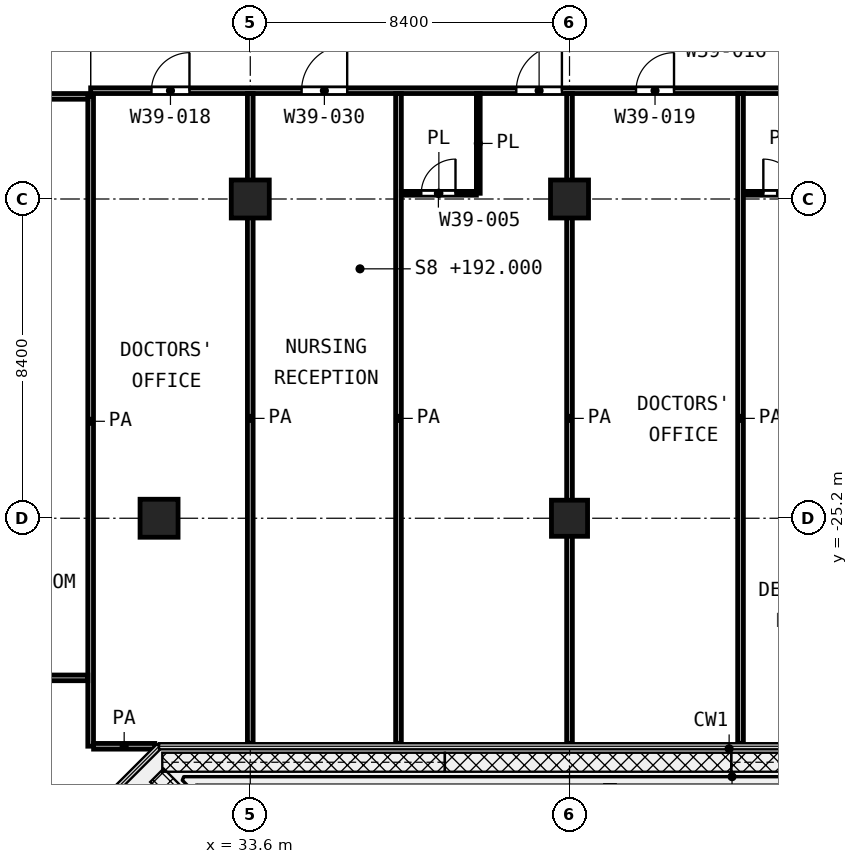
"""IFC4 building model, lengths in metres.
Left out: names, types, materials, properties, quantities, classifications, styles, units other than length and angle.
Written with IfcOpenShell. Run it as: python <this file> out.ifc"""

import sys

from ifc_helpers import new_model, si_unit, direction, frame, frame_2d, origin, origin_2d, place, context, subcontext, project, spatial, rectangle, extrude, element, fill, save


model = new_model("IFC4")
c1 = context("Model", 3, precision=1e-05, world=origin(), true_north=direction((0.0, 1.0)))
c2 = subcontext(c1, "Body", "Model", "MODEL_VIEW")
j1 = project(units=[si_unit("LENGTHUNIT", "METRE"), si_unit("PLANEANGLEUNIT", "RADIAN")], contexts=[c1])
p1 = place(None, origin())
s1 = spatial("IfcSite", under=j1, at=p1, CompositionType="ELEMENT")
p2 = place(p1, origin())
s2 = spatial("IfcBuilding", under=s1, at=p2, CompositionType="ELEMENT")
p3 = place(p2, frame((0.0, 0.0, 192.0)))
s3 = spatial("IfcBuildingStorey", under=s2, at=p3, CompositionType="ELEMENT", Elevation=192.0)
for number, where, z_axis, x_axis in (
    (1, (33.6, -16.8, 0.0), (0.0, 0.0, 1.0), (1.0, 0.0, 0.0)),
    (2, (42.0, -16.8, 0.0), (0.0, 0.0, 1.0), (1.0, 0.0, 0.0)),
    (3, (31.2, -25.2, 0.0), (0.0, 0.0, 1.0), (1.0, 0.0, 0.0)),
):
    element("IfcColumn", number, at=place(p3, frame(where, z_axis=z_axis, x_axis=x_axis)), inside=s3, PredefinedType="COLUMN", context=c2, shape_type="SweptSolid", body=[
        extrude(rectangle(XDim=1.0, YDim=1.0, at=origin_2d()), origin(), (0.0, 0.0, 1.0), 4.2),
    ])
p4 = place(p3, frame((42.0, -25.2, 0.0), z_axis=(0.0, 0.0, 1.0), x_axis=(1.0, 0.0, 0.0)))
e4 = element("IfcColumn", 4, at=p4, inside=s3, PredefinedType="COLUMN", context=c2, shape_type="SweptSolid", body=[
    extrude(rectangle(XDim=0.95, YDim=0.95, at=origin_2d()), origin(), (0.0, 0.0, 1.0), 4.2),
])
p5 = place(p3, frame((37.575, -16.65, 0.0), z_axis=(0.0, 0.0, 1.0), x_axis=(1.0, 0.0, 0.0)))
e5 = element("IfcWall", 5, at=p5, inside=s3, PredefinedType="PARTITIONING", context=c2, shape_type="SweptSolid", body=[
    extrude(rectangle(XDim=1.975, YDim=0.1, at=frame_2d((0.988, 0.0))), origin(), (0.0, 0.0, 1.0), 3.6),
])
p6 = place(p5, frame((0.525, 0.0, 0.0)))
e6 = element("IfcOpeningElement", 6, at=p6, cuts=e5, PredefinedType="OPENING", context=c2, shape_type="SweptSolid", body=[
    extrude(rectangle(XDim=0.9, YDim=2.1, at=frame_2d((0.45, 1.05))), frame((0.0, 0.06, 0.0), z_axis=(0.0, -1.0, 0.0), x_axis=(1.0, 0.0, 0.0)), (0.0, 0.0, 1.0), 0.12),
])
p7 = place(p3, frame((46.575, -16.65, 0.0), z_axis=(0.0, 0.0, 1.0), x_axis=(1.0, 0.0, 0.0)))
e7 = element("IfcWall", 7, at=p7, inside=s3, PredefinedType="PARTITIONING", context=c2, shape_type="SweptSolid", body=[
    extrude(rectangle(XDim=1.975, YDim=0.1, at=frame_2d((0.988, 0.0))), origin(), (0.0, 0.0, 1.0), 3.6),
])
p8 = place(p7, frame((0.525, 0.0, 0.0)))
e8 = element("IfcOpeningElement", 8, at=p8, cuts=e7, PredefinedType="OPENING", context=c2, shape_type="SweptSolid", body=[
    extrude(rectangle(XDim=0.9, YDim=2.1, at=frame_2d((0.45, 1.05))), frame((0.0, 0.06, 0.0), z_axis=(0.0, -1.0, 0.0), x_axis=(1.0, 0.0, 0.0)), (0.0, 0.0, 1.0), 0.12),
])
p9 = place(p3, frame((39.6, -16.65, 0.0), z_axis=(0.0, 0.0, 1.0), x_axis=(0.0, 1.0, 0.0)))
e9 = element("IfcWall", 9, at=p9, inside=s3, PredefinedType="PARTITIONING", context=c2, shape_type="SweptSolid", body=[
    extrude(rectangle(XDim=2.625, YDim=0.1, at=frame_2d((1.312, 0.0))), origin(), (0.0, 0.0, 1.0), 3.6),
])
p10 = place(p3, frame((29.477, -31.2, 0.0), z_axis=(0.0, 0.0, 1.0), x_axis=(1.0, 0.0, 0.0)))
e10 = element("IfcWall", 10, at=p10, inside=s3, PredefinedType="PARTITIONING", context=c2, shape_type="SweptSolid", body=[
    extrude(rectangle(XDim=1.61, YDim=0.15, at=frame_2d((0.805, 0.0))), origin(), (0.0, 0.0, 1.0), 3.6),
])
p11 = place(p3, frame((14.175, -29.4, 0.0), z_axis=(0.0, 0.0, 1.0), x_axis=(1.0, 0.0, 0.0)))
e11 = element("IfcWall", 11, at=p11, inside=s3, PredefinedType="PARTITIONING", context=c2, shape_type="SweptSolid", body=[
    extrude(rectangle(XDim=15.15, YDim=0.15, at=frame_2d((7.575, 0.0))), origin(), (0.0, 0.0, 1.0), 3.6),
])
p12 = place(p3, frame((24.9, -14.1, 0.0), z_axis=(0.0, 0.0, 1.0), x_axis=(1.0, 0.0, 0.0)))
e12 = element("IfcWall", 12, at=p12, inside=s3, PredefinedType="PARTITIONING", context=c2, shape_type="SweptSolid", body=[
    extrude(rectangle(XDim=4.425, YDim=0.15, at=frame_2d((2.212, 0.0))), origin(), (0.0, 0.0, 1.0), 3.6),
])
p13 = place(p12, frame((1.65, 0.0, 0.0)))
e13 = element("IfcOpeningElement", 13, at=p13, cuts=e12, PredefinedType="OPENING", context=c2, shape_type="SweptSolid", body=[
    extrude(rectangle(XDim=1.5, YDim=2.1, at=frame_2d((0.75, 1.05))), frame((0.0, 0.085, 0.0), z_axis=(0.0, -1.0, 0.0), x_axis=(1.0, 0.0, 0.0)), (0.0, 0.0, 1.0), 0.17),
])
p14 = place(p3, frame((29.4, -13.95, 0.0), z_axis=(0.0, 0.0, 1.0), x_axis=(1.0, 0.0, 0.0)))
e14 = element("IfcWall", 14, at=p14, inside=s3, PredefinedType="PARTITIONING", context=c2, shape_type="SweptSolid", body=[
    extrude(rectangle(XDim=37.72, YDim=0.15, at=frame_2d((18.86, 0.0))), origin(), (0.0, 0.0, 1.0), 3.6),
])
p15 = place(p14, frame((1.6, 0.0, 0.0)))
e15 = element("IfcOpeningElement", 15, at=p15, cuts=e14, PredefinedType="OPENING", context=c2, shape_type="SweptSolid", body=[
    extrude(rectangle(XDim=1.0, YDim=2.1, at=frame_2d((0.5, 1.05))), frame((0.0, 0.085, 0.0), z_axis=(0.0, -1.0, 0.0), x_axis=(1.0, 0.0, 0.0)), (0.0, 0.0, 1.0), 0.17),
])
p16 = place(p14, frame((5.55, 0.0, 0.0)))
e16 = element("IfcOpeningElement", 16, at=p16, cuts=e14, PredefinedType="OPENING", context=c2, shape_type="SweptSolid", body=[
    extrude(rectangle(XDim=1.2, YDim=2.1, at=frame_2d((0.6, 1.05))), frame((0.0, 0.085, 0.0), z_axis=(0.0, -1.0, 0.0), x_axis=(1.0, 0.0, 0.0)), (0.0, 0.0, 1.0), 0.17),
])
p17 = place(p14, frame((11.2, 0.0, 0.0)))
e17 = element("IfcOpeningElement", 17, at=p17, cuts=e14, PredefinedType="OPENING", context=c2, shape_type="SweptSolid", body=[
    extrude(rectangle(XDim=1.2, YDim=2.1, at=frame_2d((0.6, 1.05))), frame((0.0, 0.085, 0.0), z_axis=(0.0, -1.0, 0.0), x_axis=(1.0, 0.0, 0.0)), (0.0, 0.0, 1.0), 0.17),
])
p18 = place(p14, frame((14.35, 0.0, 0.0)))
e18 = element("IfcOpeningElement", 18, at=p18, cuts=e14, PredefinedType="OPENING", context=c2, shape_type="SweptSolid", body=[
    extrude(rectangle(XDim=1.0, YDim=2.1, at=frame_2d((0.5, 1.05))), frame((0.0, 0.085, 0.0), z_axis=(0.0, -1.0, 0.0), x_axis=(1.0, 0.0, 0.0)), (0.0, 0.0, 1.0), 0.17),
])
p19 = place(p14, frame((19.6, 0.0, 0.0)))
e19 = element("IfcOpeningElement", 19, at=p19, cuts=e14, PredefinedType="OPENING", context=c2, shape_type="SweptSolid", body=[
    extrude(rectangle(XDim=1.2, YDim=2.1, at=frame_2d((0.6, 1.05))), frame((0.0, 0.085, 0.0), z_axis=(0.0, -1.0, 0.0), x_axis=(1.0, 0.0, 0.0)), (0.0, 0.0, 1.0), 0.17),
])
p20 = place(p14, frame((21.2, 0.0, 0.0)))
e20 = element("IfcOpeningElement", 20, at=p20, cuts=e14, PredefinedType="OPENING", context=c2, shape_type="SweptSolid", body=[
    extrude(rectangle(XDim=1.1, YDim=2.1, at=frame_2d((0.55, 1.05))), frame((0.0, 0.085, 0.0), z_axis=(0.0, -1.0, 0.0), x_axis=(1.0, 0.0, 0.0)), (0.0, 0.0, 1.0), 0.17),
])
p21 = place(p14, frame((27.9, 0.0, 0.0)))
e21 = element("IfcOpeningElement", 21, at=p21, cuts=e14, PredefinedType="OPENING", context=c2, shape_type="SweptSolid", body=[
    extrude(rectangle(XDim=1.2, YDim=2.1, at=frame_2d((0.6, 1.05))), frame((0.0, 0.085, 0.0), z_axis=(0.0, -1.0, 0.0), x_axis=(1.0, 0.0, 0.0)), (0.0, 0.0, 1.0), 0.17),
])
p22 = place(p14, frame((31.0, 0.0, 0.0)))
e22 = element("IfcOpeningElement", 22, at=p22, cuts=e14, PredefinedType="OPENING", context=c2, shape_type="SweptSolid", body=[
    extrude(rectangle(XDim=1.0, YDim=2.1, at=frame_2d((0.5, 1.05))), frame((0.0, 0.085, 0.0), z_axis=(0.0, -1.0, 0.0), x_axis=(1.0, 0.0, 0.0)), (0.0, 0.0, 1.0), 0.17),
])
p23 = place(p14, frame((35.2, 0.0, 0.0)))
e23 = element("IfcOpeningElement", 23, at=p23, cuts=e14, PredefinedType="OPENING", context=c2, shape_type="SweptSolid", body=[
    extrude(rectangle(XDim=1.0, YDim=2.1, at=frame_2d((0.5, 1.05))), frame((0.0, 0.085, 0.0), z_axis=(0.0, -1.0, 0.0), x_axis=(1.0, 0.0, 0.0)), (0.0, 0.0, 1.0), 0.17),
])
p24 = place(p3, frame((29.4, -31.198, 0.0), z_axis=(0.0, 0.0, 1.0), x_axis=(0.0, 1.0, 0.0)))
e24 = element("IfcWall", 24, at=p24, inside=s3, PredefinedType="PARTITIONING", context=c2, shape_type="SweptSolid", body=[
    extrude(rectangle(XDim=17.098, YDim=0.15, at=frame_2d((8.549, 0.0))), origin(), (0.0, 0.0, 1.0), 3.6),
])
for number, where, z_axis, x_axis in (
    (25, (33.6, -31.12, 0.0), (0.0, 0.0, 1.0), (0.0, 1.0, 0.0)),
    (26, (37.5, -31.12, 0.0), (0.0, 0.0, 1.0), (0.0, 1.0, 0.0)),
    (27, (42.0, -31.12, 0.0), (0.0, 0.0, 1.0), (0.0, 1.0, 0.0)),
    (28, (46.5, -31.12, 0.0), (0.0, 0.0, 1.0), (0.0, 1.0, 0.0)),
):
    element("IfcWall", number, at=place(p3, frame(where, z_axis=z_axis, x_axis=x_axis)), inside=s3, PredefinedType="PARTITIONING", context=c2, shape_type="SweptSolid", body=[
        extrude(rectangle(XDim=17.095, YDim=0.15, at=frame_2d((8.548, 0.0))), origin(), (0.0, 0.0, 1.0), 3.6),
    ])
p25 = place(p15, origin())
e29 = element("IfcDoor", 29, at=p25, inside=s3, OperationType="SINGLE_SWING_RIGHT", PredefinedType="DOOR", context=c2, shape_type="SweptSolid", body=[
    extrude(rectangle(XDim=1.0, YDim=2.1, at=frame_2d((0.5, 1.05))), frame((0.0, 0.025, 0.0), z_axis=(0.0, -1.0, 0.0), x_axis=(1.0, 0.0, 0.0)), (0.0, 0.0, 1.0), 0.05),
])
fill(e15, e29)
p26 = place(p16, origin())
e30 = element("IfcDoor", 30, at=p26, inside=s3, OperationType="SINGLE_SWING_RIGHT", PredefinedType="DOOR", context=c2, shape_type="SweptSolid", body=[
    extrude(rectangle(XDim=1.2, YDim=2.1, at=frame_2d((0.6, 1.05))), frame((0.0, 0.025, 0.0), z_axis=(0.0, -1.0, 0.0), x_axis=(1.0, 0.0, 0.0)), (0.0, 0.0, 1.0), 0.05),
])
fill(e16, e30)
p27 = place(p17, origin())
e31 = element("IfcDoor", 31, at=p27, inside=s3, OperationType="SINGLE_SWING_RIGHT", PredefinedType="DOOR", context=c2, shape_type="SweptSolid", body=[
    extrude(rectangle(XDim=1.2, YDim=2.1, at=frame_2d((0.6, 1.05))), frame((0.0, 0.025, 0.0), z_axis=(0.0, -1.0, 0.0), x_axis=(1.0, 0.0, 0.0)), (0.0, 0.0, 1.0), 0.05),
])
fill(e17, e31)
p28 = place(p6, origin())
e32 = element("IfcDoor", 32, at=p28, inside=s3, OperationType="SINGLE_SWING_RIGHT", PredefinedType="DOOR", context=c2, shape_type="SweptSolid", body=[
    extrude(rectangle(XDim=0.9, YDim=2.1, at=frame_2d((0.45, 1.05))), frame((0.0, 0.025, 0.0), z_axis=(0.0, -1.0, 0.0), x_axis=(1.0, 0.0, 0.0)), (0.0, 0.0, 1.0), 0.05),
])
fill(e6, e32)
p29 = place(p18, origin())
e33 = element("IfcDoor", 33, at=p29, inside=s3, OperationType="SINGLE_SWING_RIGHT", PredefinedType="DOOR", context=c2, shape_type="SweptSolid", body=[
    extrude(rectangle(XDim=1.0, YDim=2.1, at=frame_2d((0.5, 1.05))), frame((0.0, 0.025, 0.0), z_axis=(0.0, -1.0, 0.0), x_axis=(1.0, 0.0, 0.0)), (0.0, 0.0, 1.0), 0.05),
])
fill(e18, e33)
p30 = place(p8, origin())
e34 = element("IfcDoor", 34, at=p30, inside=s3, OperationType="SINGLE_SWING_LEFT", PredefinedType="DOOR", context=c2, shape_type="SweptSolid", body=[
    extrude(rectangle(XDim=0.9, YDim=2.1, at=frame_2d((0.45, 1.05))), frame((0.0, 0.025, 0.0), z_axis=(0.0, -1.0, 0.0), x_axis=(1.0, 0.0, 0.0)), (0.0, 0.0, 1.0), 0.05),
])
fill(e8, e34)
save(model, sys.argv[1])
